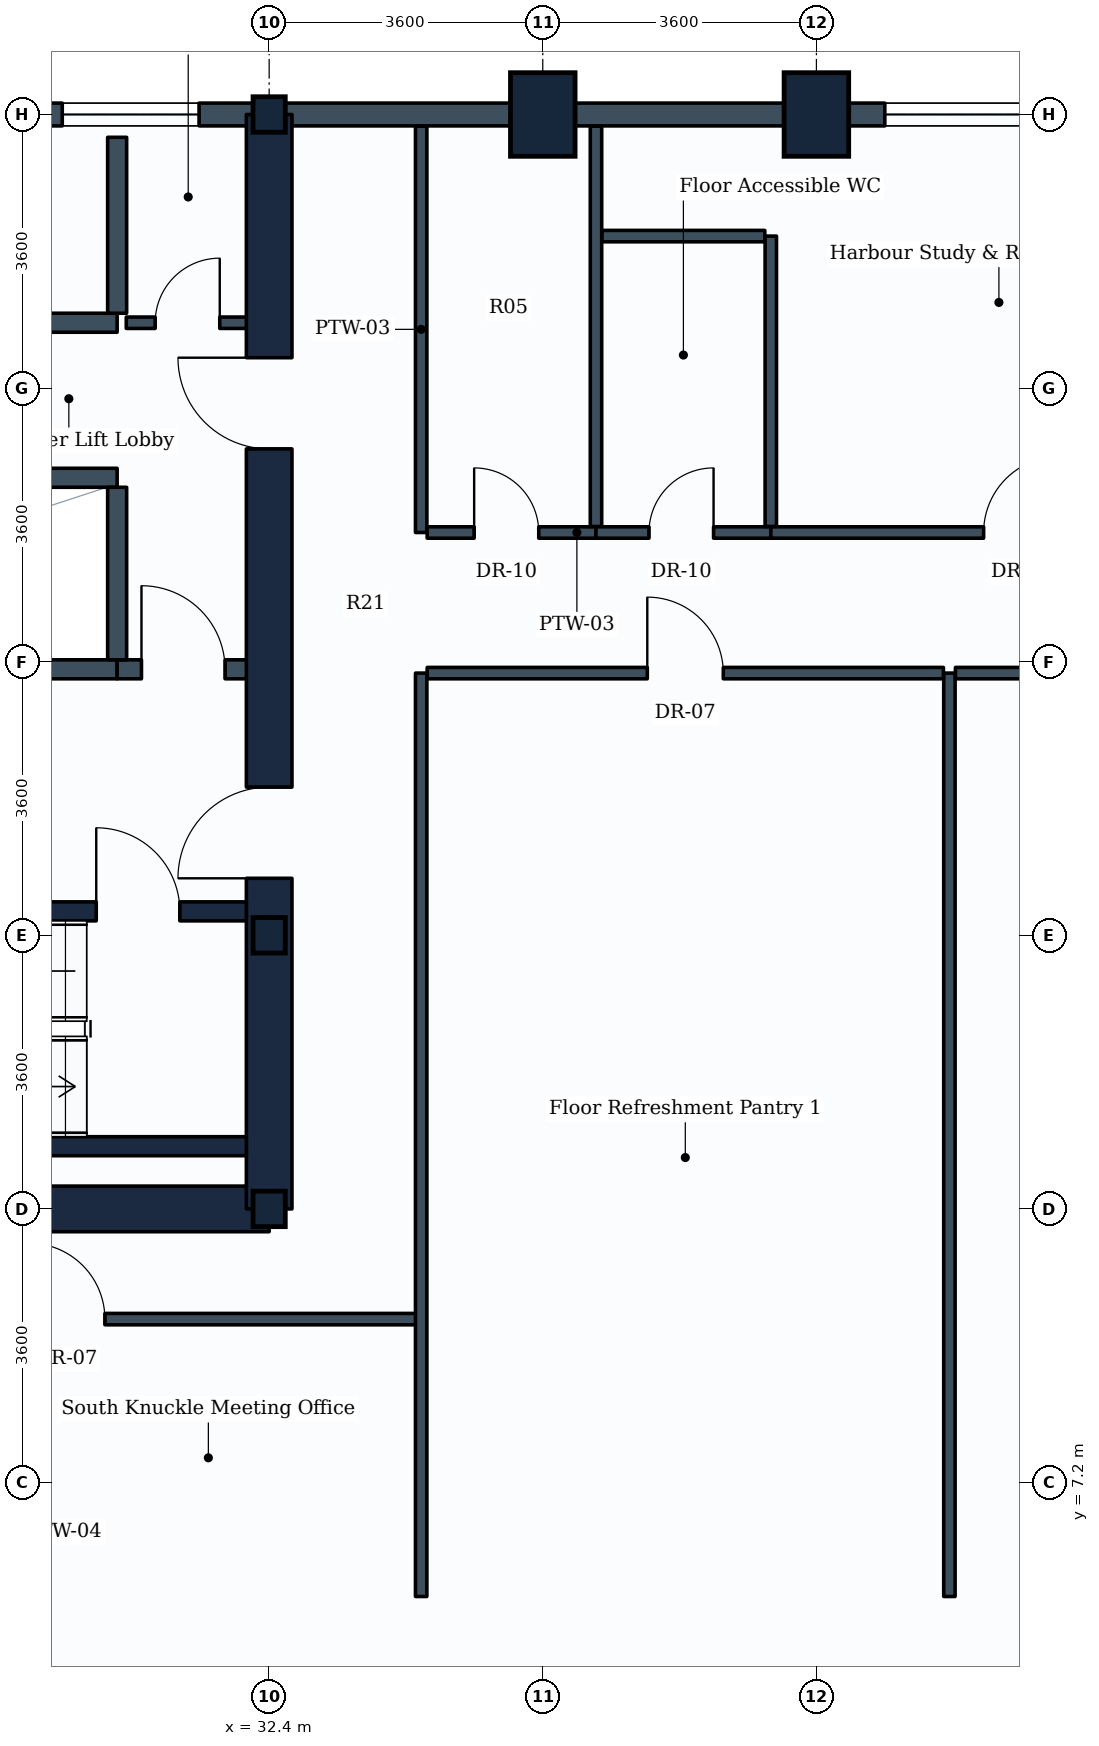
"""IFC4 building model, lengths in metres.
Left out: names, types, materials, properties, quantities, classifications, styles, units other than length and angle.
Written with IfcOpenShell. Run it as: python <this file> out.ifc"""

import sys

from ifc_helpers import new_model, si_unit, direction, frame, frame_2d, origin, origin_2d, place, context, subcontext, project, spatial, rectangle, i_section, extrude, element, fill, save


model = new_model("IFC4")
c1 = context("Model", 3, precision=1e-05, world=origin(), true_north=direction((0.0, 1.0)))
c2 = subcontext(c1, "Body", "Model", "MODEL_VIEW")
j1 = project(units=[si_unit("LENGTHUNIT", "METRE"), si_unit("PLANEANGLEUNIT", "RADIAN")], contexts=[c1])
p1 = place(None, origin())
s1 = spatial("IfcSite", under=j1, at=p1, CompositionType="ELEMENT")
p2 = place(p1, origin())
s2 = spatial("IfcBuilding", under=s1, at=p2, CompositionType="ELEMENT")
p3 = place(p2, frame((0.0, 0.0, 95.7)))
s3 = spatial("IfcBuildingStorey", under=s2, at=p3, CompositionType="ELEMENT", Elevation=95.7)
for number, where, z_axis, x_axis in (
    (1, (32.4, 10.8, 0.0), (0.0, 0.0, 1.0), (1.0, 0.0, 0.0)),
    (2, (32.4, 14.4, 0.0), (0.0, 0.0, 1.0), (1.0, 0.0, 0.0)),
    (3, (32.4, 25.2, 0.0), (0.0, 0.0, 1.0), (1.0, 0.0, 0.0)),
):
    element("IfcColumn", number, at=place(p3, frame(where, z_axis=z_axis, x_axis=x_axis)), inside=s3, PredefinedType="COLUMN", context=c2, shape_type="SweptSolid", body=[
        extrude(i_section(OverallWidth=0.424, OverallDepth=0.467, WebThickness=0.033, FlangeThickness=0.053, FilletRadius=0.015, at=origin_2d()), origin(), (0.0, 0.0, 1.0), 3.9),
    ])
for number, where, z_axis, x_axis in (
    (4, (36.0, 25.2, 0.0), (0.0, 0.0, 1.0), (1.0, 0.0, 0.0)),
    (5, (39.6, 25.2, 0.0), (0.0, 0.0, 1.0), (1.0, 0.0, 0.0)),
):
    element("IfcColumn", number, at=place(p3, frame(where, z_axis=z_axis, x_axis=x_axis)), inside=s3, PredefinedType="COLUMN", context=c2, shape_type="SweptSolid", body=[
        extrude(rectangle(XDim=0.85, YDim=1.1, at=origin_2d()), origin(), (0.0, 0.0, 1.0), 3.9),
    ])
p4 = place(p3, frame((39.6, 25.2, 0.0), z_axis=(0.0, 0.0, 1.0), x_axis=(1.0, 0.0, 0.0)))
e6 = element("IfcWall", 6, at=p4, inside=s3, PredefinedType="STANDARD", context=c2, shape_type="SweptSolid", body=[
    extrude(rectangle(XDim=3.6, YDim=0.3, at=frame_2d((1.8, 0.0))), origin(), (0.0, 0.0, 1.0), 2.93),
])
p5 = place(p4, frame((0.9, 0.0, 0.85)))
e7 = element("IfcOpeningElement", 7, at=p5, cuts=e6, PredefinedType="OPENING", context=c2, shape_type="SweptSolid", body=[
    extrude(rectangle(XDim=1.8, YDim=1.35, at=frame_2d((0.9, 0.675))), frame((0.0, 0.16, 0.0), z_axis=(0.0, -1.0, 0.0), x_axis=(1.0, 0.0, 0.0)), (0.0, 0.0, 1.0), 0.32),
])
for number, where, z_axis, x_axis in (
    (8, (36.0, 25.2, 0.0), (0.0, 0.0, 1.0), (1.0, 0.0, 0.0)),
    (9, (32.4, 25.2, 0.0), (0.0, 0.0, 1.0), (1.0, 0.0, 0.0)),
):
    element("IfcWall", number, at=place(p3, frame(where, z_axis=z_axis, x_axis=x_axis)), inside=s3, PredefinedType="STANDARD", context=c2, shape_type="SweptSolid", body=[
        extrude(rectangle(XDim=3.6, YDim=0.3, at=frame_2d((1.8, 0.0))), origin(), (0.0, 0.0, 1.0), 2.93),
    ])
p6 = place(p3, frame((28.8, 25.2, 0.0), z_axis=(0.0, 0.0, 1.0), x_axis=(1.0, 0.0, 0.0)))
e10 = element("IfcWall", 10, at=p6, inside=s3, PredefinedType="STANDARD", context=c2, shape_type="SweptSolid", body=[
    extrude(rectangle(XDim=3.6, YDim=0.3, at=frame_2d((1.8, 0.0))), origin(), (0.0, 0.0, 1.0), 3.635),
])
p7 = place(p6, frame((0.878, 0.0, 0.85)))
e11 = element("IfcOpeningElement", 11, at=p7, cuts=e10, PredefinedType="OPENING", context=c2, shape_type="SweptSolid", body=[
    extrude(rectangle(XDim=1.8, YDim=1.35, at=frame_2d((0.9, 0.675))), frame((0.0, 0.16, 0.0), z_axis=(0.0, -1.0, 0.0), x_axis=(1.0, 0.0, 0.0)), (0.0, 0.0, 1.0), 0.32),
])
p8 = place(p3, frame((14.4, 10.8, 0.0), z_axis=(0.0, 0.0, 1.0), x_axis=(1.0, 0.0, 0.0)))
e12 = element("IfcWall", 12, at=p8, inside=s3, PredefinedType="SHEAR", context=c2, shape_type="SweptSolid", body=[
    extrude(rectangle(XDim=18.0, YDim=0.6, at=frame_2d((9.0, 0.0))), origin(), (0.0, 0.0, 1.0), 3.65),
])
p9 = place(p3, frame((32.4, 10.8, 0.0), z_axis=(0.0, 0.0, 1.0), x_axis=(0.0, 1.0, 0.0)))
e13 = element("IfcWall", 13, at=p9, inside=s3, PredefinedType="SHEAR", context=c2, shape_type="SweptSolid", body=[
    extrude(rectangle(XDim=14.4, YDim=0.6, at=frame_2d((7.2, 0.0))), origin(), (0.0, 0.0, 1.0), 3.65),
])
p10 = place(p9, frame((4.35, 0.0, 0.0)))
e14 = element("IfcOpeningElement", 14, at=p10, cuts=e13, PredefinedType="OPENING", context=c2, shape_type="SweptSolid", body=[
    extrude(rectangle(XDim=1.2, YDim=2.1, at=frame_2d((0.6, 1.05))), frame((0.0, 0.31, 0.0), z_axis=(0.0, -1.0, 0.0), x_axis=(1.0, 0.0, 0.0)), (0.0, 0.0, 1.0), 0.62),
])
p11 = place(p9, frame((10.0, 0.0, 0.0)))
e15 = element("IfcOpeningElement", 15, at=p11, cuts=e13, PredefinedType="OPENING", context=c2, shape_type="SweptSolid", body=[
    extrude(rectangle(XDim=1.2, YDim=2.1, at=frame_2d((0.6, 1.05))), frame((0.0, 0.31, 0.0), z_axis=(0.0, -1.0, 0.0), x_axis=(1.0, 0.0, 0.0)), (0.0, 0.0, 1.0), 0.62),
])
p12 = place(p3, frame((23.35, 11.625, 0.0), z_axis=(0.0, 0.0, 1.0), x_axis=(1.0, 0.0, 0.0)))
e16 = element("IfcWall", 16, at=p12, inside=s3, PredefinedType="SHEAR", context=c2, shape_type="SweptSolid", body=[
    extrude(rectangle(XDim=8.75, YDim=0.25, at=frame_2d((4.375, 0.0))), origin(), (0.0, 0.0, 1.0), 3.65),
])
p13 = place(p3, frame((23.35, 14.715, 0.0), z_axis=(0.0, 0.0, 1.0), x_axis=(1.0, 0.0, 0.0)))
e17 = element("IfcWall", 17, at=p13, inside=s3, PredefinedType="SHEAR", context=c2, shape_type="SweptSolid", body=[
    extrude(rectangle(XDim=8.75, YDim=0.25, at=frame_2d((4.375, 0.0))), origin(), (0.0, 0.0, 1.0), 3.65),
])
p14 = place(p13, frame((6.775, 0.0, 0.0)))
e18 = element("IfcOpeningElement", 18, at=p14, cuts=e17, PredefinedType="OPENING", context=c2, shape_type="SweptSolid", body=[
    extrude(rectangle(XDim=1.1, YDim=2.1, at=frame_2d((0.55, 1.05))), frame((0.0, 0.135, 0.0), z_axis=(0.0, -1.0, 0.0), x_axis=(1.0, 0.0, 0.0)), (0.0, 0.0, 1.0), 0.27),
])
p15 = place(p3, frame((21.88, 17.9, 0.0), z_axis=(0.0, 0.0, 1.0), x_axis=(1.0, 0.0, 0.0)))
e19 = element("IfcWall", 19, at=p15, inside=s3, PredefinedType="PARTITIONING", context=c2, shape_type="SweptSolid", body=[
    extrude(rectangle(XDim=8.52, YDim=0.25, at=frame_2d((4.26, 0.0))), origin(), (0.0, 0.0, 1.0), 3.635),
])
p16 = place(p3, frame((30.4, 17.9, 0.0), z_axis=(0.0, 0.0, 1.0), x_axis=(1.0, 0.0, 0.0)))
e20 = element("IfcWall", 20, at=p16, inside=s3, PredefinedType="PARTITIONING", context=c2, shape_type="SweptSolid", body=[
    extrude(rectangle(XDim=1.75, YDim=0.25, at=frame_2d((0.875, 0.0))), origin(), (0.0, 0.0, 1.0), 3.635),
])
p17 = place(p16, frame((0.32, 0.0, 0.0)))
e21 = element("IfcOpeningElement", 21, at=p17, cuts=e20, PredefinedType="OPENING", context=c2, shape_type="SweptSolid", body=[
    extrude(rectangle(XDim=1.1, YDim=2.1, at=frame_2d((0.55, 1.05))), frame((0.0, 0.135, 0.0), z_axis=(0.0, -1.0, 0.0), x_axis=(1.0, 0.0, 0.0)), (0.0, 0.0, 1.0), 0.27),
])
p18 = place(p3, frame((23.18, 20.42, 0.0), z_axis=(0.0, 0.0, 1.0), x_axis=(1.0, 0.0, 0.0)))
e22 = element("IfcWall", 22, at=p18, inside=s3, PredefinedType="PARTITIONING", context=c2, shape_type="SweptSolid", body=[
    extrude(rectangle(XDim=7.22, YDim=0.25, at=frame_2d((3.61, 0.0))), origin(), (0.0, 0.0, 1.0), 3.635),
])
p19 = place(p3, frame((30.4, 18.025, 0.0), z_axis=(0.0, 0.0, 1.0), x_axis=(0.0, 1.0, 0.0)))
e23 = element("IfcWall", 23, at=p19, inside=s3, PredefinedType="PARTITIONING", context=c2, shape_type="SweptSolid", body=[
    extrude(rectangle(XDim=2.27, YDim=0.25, at=frame_2d((1.135, 0.0))), origin(), (0.0, 0.0, 1.0), 3.635),
])
p20 = place(p3, frame((23.18, 22.46, 0.0), z_axis=(0.0, 0.0, 1.0), x_axis=(1.0, 0.0, 0.0)))
e24 = element("IfcWall", 24, at=p20, inside=s3, PredefinedType="PARTITIONING", context=c2, shape_type="SweptSolid", body=[
    extrude(rectangle(XDim=7.22, YDim=0.25, at=frame_2d((3.61, 0.0))), origin(), (0.0, 0.0, 1.0), 3.635),
])
p21 = place(p3, frame((30.4, 22.585, 0.0), z_axis=(0.0, 0.0, 1.0), x_axis=(0.0, 1.0, 0.0)))
e25 = element("IfcWall", 25, at=p21, inside=s3, PredefinedType="PARTITIONING", context=c2, shape_type="SweptSolid", body=[
    extrude(rectangle(XDim=2.315, YDim=0.25, at=frame_2d((1.157, 0.0))), origin(), (0.0, 0.0, 1.0), 3.635),
])
p22 = place(p3, frame((30.52, 22.46, 0.0), z_axis=(0.0, 0.0, 1.0), x_axis=(1.0, 0.0, 0.0)))
e26 = element("IfcWall", 26, at=p22, inside=s3, PredefinedType="PARTITIONING", context=c2, shape_type="SweptSolid", body=[
    extrude(rectangle(XDim=1.63, YDim=0.15, at=frame_2d((0.815, 0.0))), origin(), (0.0, 0.0, 1.0), 3.635),
])
p23 = place(p22, frame((0.38, 0.0, 0.0)))
e27 = element("IfcOpeningElement", 27, at=p23, cuts=e26, PredefinedType="OPENING", context=c2, shape_type="SweptSolid", body=[
    extrude(rectangle(XDim=0.85, YDim=2.1, at=frame_2d((0.425, 1.05))), frame((0.0, 0.085, 0.0), z_axis=(0.0, -1.0, 0.0), x_axis=(1.0, 0.0, 0.0)), (0.0, 0.0, 1.0), 0.17),
])
p24 = place(p3, frame((34.4, 19.7, 0.0), z_axis=(0.0, 0.0, 1.0), x_axis=(0.0, 1.0, 0.0)))
e28 = element("IfcWall", 28, at=p24, inside=s3, PredefinedType="PARTITIONING", context=c2, shape_type="SweptSolid", body=[
    extrude(rectangle(XDim=5.346, YDim=0.15, at=frame_2d((2.673, 0.0))), origin(), (0.0, 0.0, 1.0), 2.93),
])
p25 = place(p3, frame((34.479, 19.7, 0.0), z_axis=(0.0, 0.0, 1.0), x_axis=(1.0, 0.0, 0.0)))
e29 = element("IfcWall", 29, at=p25, inside=s3, PredefinedType="PARTITIONING", context=c2, shape_type="SweptSolid", body=[
    extrude(rectangle(XDim=2.221, YDim=0.15, at=frame_2d((1.11, 0.0))), origin(), (0.0, 0.0, 1.0), 3.18),
])
p26 = place(p25, frame((0.618, 0.0, 0.0)))
e30 = element("IfcOpeningElement", 30, at=p26, cuts=e29, PredefinedType="OPENING", context=c2, shape_type="SweptSolid", body=[
    extrude(rectangle(XDim=0.85, YDim=2.1, at=frame_2d((0.425, 1.05))), frame((0.0, 0.085, 0.0), z_axis=(0.0, -1.0, 0.0), x_axis=(1.0, 0.0, 0.0)), (0.0, 0.0, 1.0), 0.17),
])
p27 = place(p3, frame((36.7, 19.779, 0.0), z_axis=(0.0, 0.0, 1.0), x_axis=(0.0, 1.0, 0.0)))
e31 = element("IfcWall", 31, at=p27, inside=s3, PredefinedType="PARTITIONING", context=c2, shape_type="SweptSolid", body=[
    extrude(rectangle(XDim=5.267, YDim=0.15, at=frame_2d((2.633, 0.0))), origin(), (0.0, 0.0, 1.0), 2.93),
])
p28 = place(p3, frame((36.7, 19.7, 0.0), z_axis=(0.0, 0.0, 1.0), x_axis=(1.0, 0.0, 0.0)))
e32 = element("IfcWall", 32, at=p28, inside=s3, PredefinedType="PARTITIONING", context=c2, shape_type="SweptSolid", body=[
    extrude(rectangle(XDim=2.3, YDim=0.15, at=frame_2d((1.15, 0.0))), origin(), (0.0, 0.0, 1.0), 3.635),
])
p29 = place(p28, frame((0.697, 0.0, 0.0)))
e33 = element("IfcOpeningElement", 33, at=p29, cuts=e32, PredefinedType="OPENING", context=c2, shape_type="SweptSolid", body=[
    extrude(rectangle(XDim=0.85, YDim=2.1, at=frame_2d((0.425, 1.05))), frame((0.0, 0.085, 0.0), z_axis=(0.0, -1.0, 0.0), x_axis=(1.0, 0.0, 0.0)), (0.0, 0.0, 1.0), 0.17),
])
p30 = place(p3, frame((39.0, 19.779, 0.0), z_axis=(0.0, 0.0, 1.0), x_axis=(0.0, 1.0, 0.0)))
e34 = element("IfcWall", 34, at=p30, inside=s3, PredefinedType="PARTITIONING", context=c2, shape_type="SweptSolid", body=[
    extrude(rectangle(XDim=3.821, YDim=0.15, at=frame_2d((1.911, 0.0))), origin(), (0.0, 0.0, 1.0), 3.18),
])
p31 = place(p3, frame((36.779, 23.6, 0.0), z_axis=(0.0, 0.0, 1.0), x_axis=(1.0, 0.0, 0.0)))
e35 = element("IfcWall", 35, at=p31, inside=s3, PredefinedType="PARTITIONING", context=c2, shape_type="SweptSolid", body=[
    extrude(rectangle(XDim=2.142, YDim=0.15, at=frame_2d((1.071, 0.0))), origin(), (0.0, 0.0, 1.0), 3.635),
])
p32 = place(p3, frame((28.879, 9.35, 0.0), z_axis=(0.0, 0.0, 1.0), x_axis=(1.0, 0.0, 0.0)))
e36 = element("IfcWall", 36, at=p32, inside=s3, PredefinedType="PARTITIONING", context=c2, shape_type="SweptSolid", body=[
    extrude(rectangle(XDim=5.521, YDim=0.15, at=frame_2d((2.76, 0.0))), origin(), (0.0, 0.0, 1.0), 3.635),
])
p33 = place(p32, frame((0.36, 0.0, 0.0)))
e37 = element("IfcOpeningElement", 37, at=p33, cuts=e36, PredefinedType="OPENING", context=c2, shape_type="SweptSolid", body=[
    extrude(rectangle(XDim=1.0, YDim=2.1, at=frame_2d((0.5, 1.05))), frame((0.0, 0.085, 0.0), z_axis=(0.0, -1.0, 0.0), x_axis=(1.0, 0.0, 0.0)), (0.0, 0.0, 1.0), 0.17),
])
for number, where, z_axis, x_axis in (
    (38, (34.4, 5.7, 0.0), (0.0, 0.0, 1.0), (0.0, 1.0, 0.0)),
    (39, (41.35, 5.7, 0.0), (0.0, 0.0, 1.0), (0.0, 1.0, 0.0)),
):
    element("IfcWall", number, at=place(p3, frame(where, z_axis=z_axis, x_axis=x_axis)), inside=s3, PredefinedType="PARTITIONING", context=c2, shape_type="SweptSolid", body=[
        extrude(rectangle(XDim=12.15, YDim=0.15, at=frame_2d((6.075, 0.0))), origin(), (0.0, 0.0, 1.0), 3.18),
    ])
p34 = place(p3, frame((34.479, 17.85, 0.0), z_axis=(0.0, 0.0, 1.0), x_axis=(1.0, 0.0, 0.0)))
e40 = element("IfcWall", 40, at=p34, inside=s3, PredefinedType="PARTITIONING", context=c2, shape_type="SweptSolid", body=[
    extrude(rectangle(XDim=6.792, YDim=0.15, at=frame_2d((3.396, 0.0))), origin(), (0.0, 0.0, 1.0), 3.18),
])
p35 = place(p34, frame((2.896, 0.0, 0.0)))
e41 = element("IfcOpeningElement", 41, at=p35, cuts=e40, PredefinedType="OPENING", context=c2, shape_type="SweptSolid", body=[
    extrude(rectangle(XDim=1.0, YDim=2.1, at=frame_2d((0.5, 1.05))), frame((0.0, 0.085, 0.0), z_axis=(0.0, -1.0, 0.0), x_axis=(1.0, 0.0, 0.0)), (0.0, 0.0, 1.0), 0.17),
])
p36 = place(p3, frame((41.429, 17.85, 0.0), z_axis=(0.0, 0.0, 1.0), x_axis=(1.0, 0.0, 0.0)))
e42 = element("IfcWall", 42, at=p36, inside=s3, PredefinedType="PARTITIONING", context=c2, shape_type="SweptSolid", body=[
    extrude(rectangle(XDim=10.771, YDim=0.15, at=frame_2d((5.385, 0.0))), origin(), (0.0, 0.0, 1.0), 3.18),
])
p37 = place(p36, frame((4.806, 0.0, 0.0)))
e43 = element("IfcOpeningElement", 43, at=p37, cuts=e42, PredefinedType="OPENING", context=c2, shape_type="SweptSolid", body=[
    extrude(rectangle(XDim=1.0, YDim=2.1, at=frame_2d((0.5, 1.05))), frame((0.0, 0.085, 0.0), z_axis=(0.0, -1.0, 0.0), x_axis=(1.0, 0.0, 0.0)), (0.0, 0.0, 1.0), 0.17),
])
p38 = place(p3, frame((39.0, 19.7, 0.0), z_axis=(0.0, 0.0, 1.0), x_axis=(1.0, 0.0, 0.0)))
e44 = element("IfcWall", 44, at=p38, inside=s3, PredefinedType="PARTITIONING", context=c2, shape_type="SweptSolid", body=[
    extrude(rectangle(XDim=6.521, YDim=0.15, at=frame_2d((3.26, 0.0))), origin(), (0.0, 0.0, 1.0), 3.19),
])
p39 = place(p38, frame((2.8, 0.0, 0.0)))
e45 = element("IfcOpeningElement", 45, at=p39, cuts=e44, PredefinedType="OPENING", context=c2, shape_type="SweptSolid", body=[
    extrude(rectangle(XDim=1.0, YDim=2.1, at=frame_2d((0.5, 1.05))), frame((0.0, 0.085, 0.0), z_axis=(0.0, -1.0, 0.0), x_axis=(1.0, 0.0, 0.0)), (0.0, 0.0, 1.0), 0.17),
])
p40 = place(p5, origin())
e46 = element("IfcWindow", 46, at=p40, inside=s3, PartitioningType="SINGLE_PANEL", PredefinedType="WINDOW", context=c2, shape_type="SweptSolid", body=[
    extrude(rectangle(XDim=1.8, YDim=1.35, at=frame_2d((0.9, 0.675))), frame((0.0, 0.03, 0.0), z_axis=(0.0, -1.0, 0.0), x_axis=(1.0, 0.0, 0.0)), (0.0, 0.0, 1.0), 0.06),
])
fill(e7, e46)
p41 = place(p7, origin())
e47 = element("IfcWindow", 47, at=p41, inside=s3, PartitioningType="SINGLE_PANEL", PredefinedType="WINDOW", context=c2, shape_type="SweptSolid", body=[
    extrude(rectangle(XDim=1.8, YDim=1.35, at=frame_2d((0.9, 0.675))), frame((0.0, 0.03, 0.0), z_axis=(0.0, -1.0, 0.0), x_axis=(1.0, 0.0, 0.0)), (0.0, 0.0, 1.0), 0.06),
])
fill(e11, e47)
p42 = place(p14, origin())
e48 = element("IfcDoor", 48, at=p42, inside=s3, OperationType="SINGLE_SWING_LEFT", PredefinedType="DOOR", context=c2, shape_type="SweptSolid", body=[
    extrude(rectangle(XDim=1.1, YDim=2.1, at=frame_2d((0.55, 1.05))), frame((0.0, 0.025, 0.0), z_axis=(0.0, -1.0, 0.0), x_axis=(1.0, 0.0, 0.0)), (0.0, 0.0, 1.0), 0.05),
])
fill(e18, e48)
p43 = place(p10, origin())
e49 = element("IfcDoor", 49, at=p43, inside=s3, OperationType="SINGLE_SWING_LEFT", PredefinedType="DOOR", context=c2, shape_type="SweptSolid", body=[
    extrude(rectangle(XDim=1.2, YDim=2.1, at=frame_2d((0.6, 1.05))), frame((0.0, 0.025, 0.0), z_axis=(0.0, -1.0, 0.0), x_axis=(1.0, 0.0, 0.0)), (0.0, 0.0, 1.0), 0.05),
])
fill(e14, e49)
p44 = place(p17, origin())
e50 = element("IfcDoor", 50, at=p44, inside=s3, OperationType="SINGLE_SWING_LEFT", PredefinedType="DOOR", context=c2, shape_type="SweptSolid", body=[
    extrude(rectangle(XDim=1.1, YDim=2.1, at=frame_2d((0.55, 1.05))), frame((0.0, 0.025, 0.0), z_axis=(0.0, -1.0, 0.0), x_axis=(1.0, 0.0, 0.0)), (0.0, 0.0, 1.0), 0.05),
])
fill(e21, e50)
p45 = place(p11, origin())
e51 = element("IfcDoor", 51, at=p45, inside=s3, OperationType="SINGLE_SWING_RIGHT", PredefinedType="DOOR", context=c2, shape_type="SweptSolid", body=[
    extrude(rectangle(XDim=1.2, YDim=2.1, at=frame_2d((0.6, 1.05))), frame((0.0, 0.025, 0.0), z_axis=(0.0, -1.0, 0.0), x_axis=(1.0, 0.0, 0.0)), (0.0, 0.0, 1.0), 0.05),
])
fill(e15, e51)
p46 = place(p23, origin())
e52 = element("IfcDoor", 52, at=p46, inside=s3, OperationType="SINGLE_SWING_RIGHT", PredefinedType="DOOR", context=c2, shape_type="SweptSolid", body=[
    extrude(rectangle(XDim=0.85, YDim=2.1, at=frame_2d((0.425, 1.05))), frame((0.0, 0.025, 0.0), z_axis=(0.0, -1.0, 0.0), x_axis=(1.0, 0.0, 0.0)), (0.0, 0.0, 1.0), 0.05),
])
fill(e27, e52)
p47 = place(p26, origin())
e53 = element("IfcDoor", 53, at=p47, inside=s3, OperationType="SINGLE_SWING_LEFT", PredefinedType="DOOR", context=c2, shape_type="SweptSolid", body=[
    extrude(rectangle(XDim=0.85, YDim=2.1, at=frame_2d((0.425, 1.05))), frame((0.0, 0.025, 0.0), z_axis=(0.0, -1.0, 0.0), x_axis=(1.0, 0.0, 0.0)), (0.0, 0.0, 1.0), 0.05),
])
fill(e30, e53)
p48 = place(p29, origin())
e54 = element("IfcDoor", 54, at=p48, inside=s3, OperationType="SINGLE_SWING_RIGHT", PredefinedType="DOOR", context=c2, shape_type="SweptSolid", body=[
    extrude(rectangle(XDim=0.85, YDim=2.1, at=frame_2d((0.425, 1.05))), frame((0.0, 0.025, 0.0), z_axis=(0.0, -1.0, 0.0), x_axis=(1.0, 0.0, 0.0)), (0.0, 0.0, 1.0), 0.05),
])
fill(e33, e54)
p49 = place(p33, origin())
e55 = element("IfcDoor", 55, at=p49, inside=s3, OperationType="SINGLE_SWING_LEFT", PredefinedType="DOOR", context=c2, shape_type="SweptSolid", body=[
    extrude(rectangle(XDim=1.0, YDim=2.1, at=frame_2d((0.5, 1.05))), frame((0.0, 0.025, 0.0), z_axis=(0.0, -1.0, 0.0), x_axis=(1.0, 0.0, 0.0)), (0.0, 0.0, 1.0), 0.05),
])
fill(e37, e55)
p50 = place(p35, origin())
e56 = element("IfcDoor", 56, at=p50, inside=s3, OperationType="SINGLE_SWING_LEFT", PredefinedType="DOOR", context=c2, shape_type="SweptSolid", body=[
    extrude(rectangle(XDim=1.0, YDim=2.1, at=frame_2d((0.5, 1.05))), frame((0.0, 0.025, 0.0), z_axis=(0.0, -1.0, 0.0), x_axis=(1.0, 0.0, 0.0)), (0.0, 0.0, 1.0), 0.05),
])
fill(e41, e56)
p51 = place(p39, origin())
e57 = element("IfcDoor", 57, at=p51, inside=s3, OperationType="SINGLE_SWING_RIGHT", PredefinedType="DOOR", context=c2, shape_type="SweptSolid", body=[
    extrude(rectangle(XDim=1.0, YDim=2.1, at=frame_2d((0.5, 1.05))), frame((0.0, 0.025, 0.0), z_axis=(0.0, -1.0, 0.0), x_axis=(1.0, 0.0, 0.0)), (0.0, 0.0, 1.0), 0.05),
])
fill(e45, e57)
save(model, sys.argv[1])
